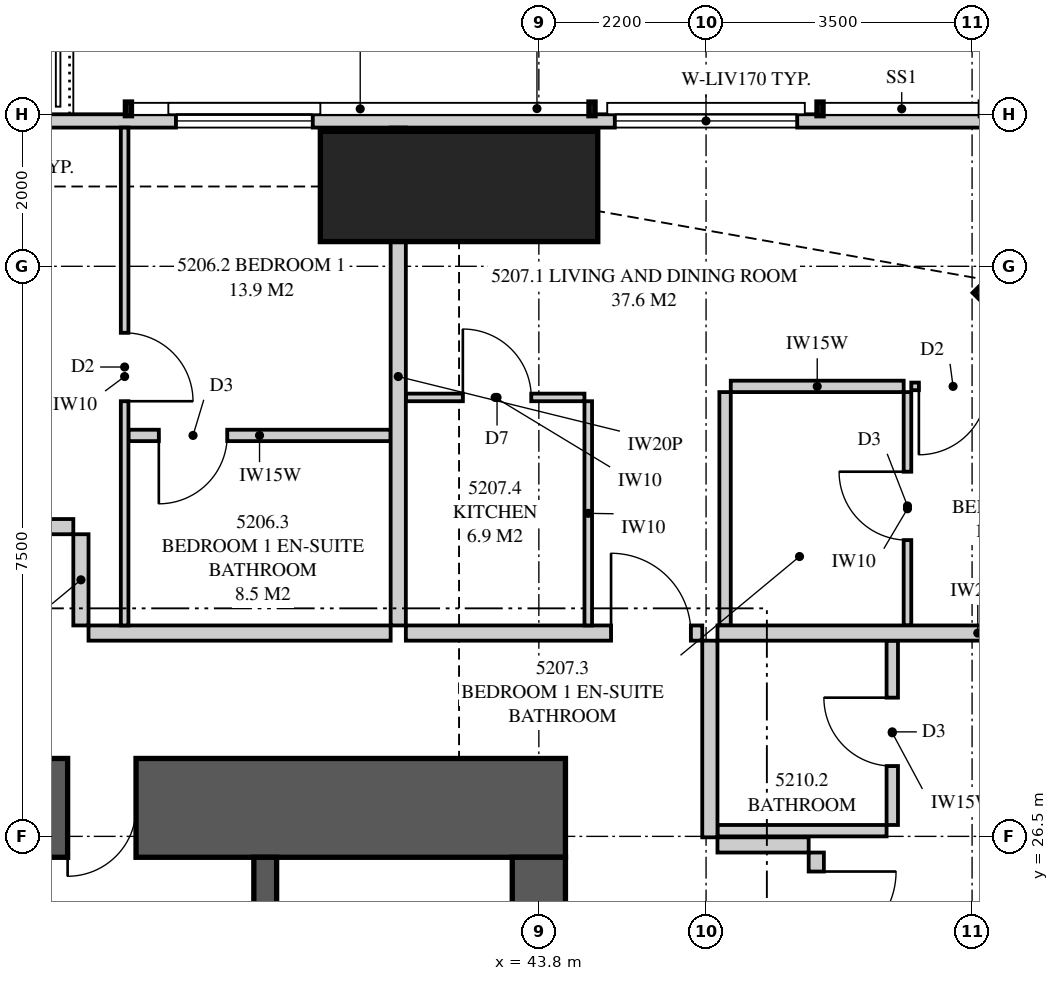
"""IFC4 building model, lengths in metres.
Left out: names, types, materials, properties, quantities, classifications, styles, units other than length and angle.
Written with IfcOpenShell. Run it as: python <this file> out.ifc"""

import sys

from ifc_helpers import new_model, si_unit, direction, frame, frame_2d, origin, origin_2d, place, context, subcontext, project, spatial, polyline, rectangle, outline, extrude, element, fill, save


model = new_model("IFC4")
c1 = context("Model", 3, precision=1e-05, world=origin(), true_north=direction((0.0, 1.0)))
c2 = subcontext(c1, "Body", "Model", "MODEL_VIEW")
j1 = project(units=[si_unit("LENGTHUNIT", "METRE"), si_unit("PLANEANGLEUNIT", "RADIAN")], contexts=[c1])
p1 = place(None, origin())
s1 = spatial("IfcSite", under=j1, at=p1, CompositionType="ELEMENT")
p2 = place(p1, origin())
s2 = spatial("IfcBuilding", under=s1, at=p2, CompositionType="ELEMENT")
p3 = place(p2, frame((0.0, 0.0, 191.2)))
s3 = spatial("IfcBuildingStorey", under=s2, at=p3, CompositionType="ELEMENT", Elevation=191.2)
p4 = place(p3, frame((50.652, 33.652, 0.0), z_axis=(0.0, 0.0, 1.0), x_axis=(0.707106781187, 0.707106781187, 0.0)))
e1 = element("IfcColumn", 1, at=p4, inside=s3, PredefinedType="COLUMN", context=c2, shape_type="SweptSolid", body=[
    extrude(rectangle(XDim=1.6, YDim=1.6, at=origin_2d()), origin(), (0.0, 0.0, 1.0), 3.35),
])
p5 = place(p3, frame((42.75, 35.05, 0.0), z_axis=(0.0, 0.0, 1.0), x_axis=(0.0, 1.0, 0.0)))
e2 = element("IfcColumn", 2, at=p5, inside=s3, PredefinedType="COLUMN", context=c2, shape_type="SweptSolid", body=[
    extrude(rectangle(XDim=1.45, YDim=3.65, at=origin_2d()), origin(), (0.0, 0.0, 1.0), 3.35),
])
p6 = place(p3, frame((44.15, 26.875, 0.0), z_axis=(0.0, 0.0, 1.0), x_axis=(-1.0, 0.0, 0.0)))
e3 = element("IfcWall", 3, at=p6, inside=s3, PredefinedType="SHEAR", context=c2, shape_type="SweptSolid", body=[
    extrude(rectangle(XDim=8.25, YDim=1.3, at=frame_2d((4.125, 0.0))), origin(), (0.0, 0.0, 1.0), 3.35),
])
p7 = place(p6, frame((5.65, 0.0, 0.0)))
e4 = element("IfcOpeningElement", 4, at=p7, cuts=e3, PredefinedType="OPENING", context=c2, shape_type="SweptSolid", body=[
    extrude(rectangle(XDim=0.9, YDim=2.1, at=frame_2d((0.45, 1.05))), frame((0.0, 0.66, 0.0), z_axis=(0.0, -1.0, 0.0), x_axis=(1.0, 0.0, 0.0)), (0.0, 0.0, 1.0), 1.32),
])
p8 = place(p3, frame((43.8, 19.3, 0.0), z_axis=(0.0, 0.0, 1.0), x_axis=(0.0, 1.0, 0.0)))
e5 = element("IfcWall", 5, at=p8, inside=s3, PredefinedType="SHEAR", context=c2, shape_type="SweptSolid", body=[
    extrude(rectangle(XDim=6.925, YDim=0.7, at=frame_2d((3.462, 0.0))), origin(), (0.0, 0.0, 1.0), 3.35),
])
p9 = place(p3, frame((40.2, 18.5, 0.0), z_axis=(0.0, 0.0, 1.0), x_axis=(0.0, 1.0, 0.0)))
e6 = element("IfcWall", 6, at=p9, inside=s3, PredefinedType="SHEAR", context=c2, shape_type="SweptSolid", body=[
    extrude(rectangle(XDim=7.725, YDim=0.3, at=frame_2d((3.863, 0.0))), origin(), (0.0, 0.0, 1.0), 3.35),
])
p10 = place(p3, frame((49.949, 35.913, 0.0), z_axis=(0.0, 0.0, 1.0), x_axis=(-1.0, 0.0, 0.0)))
e7 = element("IfcWall", 7, at=p10, inside=s3, PredefinedType="SOLIDWALL", context=c2, shape_type="SweptSolid", body=[
    extrude(outline(polyline([(0.0, 0.0), (34.897, 0.0), (34.897, 3.11), (27.91, 3.11), (27.91, 2.15), (27.836, 2.15), (27.836, 3.11), (27.699, 3.11), (27.699, 2.15), (7.199, 2.15), (7.199, 3.11), (7.062, 3.11), (7.062, 2.15), (6.987, 2.15), (6.987, 3.11), (0.0, 3.11), (0.0, 0.0)])), frame((0.0, 0.087, 0.0), z_axis=(0.0, -1.0, 0.0), x_axis=(1.0, 0.0, 0.0)), (0.0, 0.0, 1.0), 0.175),
])
p11 = place(p10, frame((2.75, 0.0, 0.4)))
e8 = element("IfcOpeningElement", 8, at=p11, cuts=e7, PredefinedType="OPENING", context=c2, shape_type="SweptSolid", body=[
    extrude(rectangle(XDim=2.4, YDim=1.7, at=frame_2d((1.2, 0.85))), frame((0.0, 0.097, 0.0), z_axis=(0.0, -1.0, 0.0), x_axis=(1.0, 0.0, 0.0)), (0.0, 0.0, 1.0), 0.195),
])
p12 = place(p10, frame((9.124, 0.0, 0.4)))
e9 = element("IfcOpeningElement", 9, at=p12, cuts=e7, PredefinedType="OPENING", context=c2, shape_type="SweptSolid", body=[
    extrude(rectangle(XDim=1.8, YDim=1.7, at=frame_2d((0.9, 0.85))), frame((0.0, 0.097, 0.0), z_axis=(0.0, -1.0, 0.0), x_axis=(1.0, 0.0, 0.0)), (0.0, 0.0, 1.0), 0.195),
])
p13 = place(p10, frame((13.174, 0.0, 0.0)))
e10 = element("IfcOpeningElement", 10, at=p13, cuts=e7, PredefinedType="OPENING", context=c2, shape_type="SweptSolid", body=[
    extrude(rectangle(XDim=1.8, YDim=2.1, at=frame_2d((0.9, 1.05))), frame((0.0, 0.097, 0.0), z_axis=(0.0, -1.0, 0.0), x_axis=(1.0, 0.0, 0.0)), (0.0, 0.0, 1.0), 0.195),
])
p14 = place(p10, frame((19.849, 0.0, 0.4)))
e11 = element("IfcOpeningElement", 11, at=p14, cuts=e7, PredefinedType="OPENING", context=c2, shape_type="SweptSolid", body=[
    extrude(rectangle(XDim=1.8, YDim=1.7, at=frame_2d((0.9, 0.85))), frame((0.0, 0.097, 0.0), z_axis=(0.0, -1.0, 0.0), x_axis=(1.0, 0.0, 0.0)), (0.0, 0.0, 1.0), 0.195),
])
p15 = place(p10, frame((23.304, 0.0, 0.4)))
e12 = element("IfcOpeningElement", 12, at=p15, cuts=e7, PredefinedType="OPENING", context=c2, shape_type="SweptSolid", body=[
    extrude(rectangle(XDim=2.4, YDim=1.7, at=frame_2d((1.2, 0.85))), frame((0.0, 0.097, 0.0), z_axis=(0.0, -1.0, 0.0), x_axis=(1.0, 0.0, 0.0)), (0.0, 0.0, 1.0), 0.195),
])
p16 = place(p10, frame((30.249, 0.0, 0.4)))
e13 = element("IfcOpeningElement", 13, at=p16, cuts=e7, PredefinedType="OPENING", context=c2, shape_type="SweptSolid", body=[
    extrude(rectangle(XDim=1.8, YDim=1.7, at=frame_2d((0.9, 0.85))), frame((0.0, 0.097, 0.0), z_axis=(0.0, -1.0, 0.0), x_axis=(1.0, 0.0, 0.0)), (0.0, 0.0, 1.0), 0.195),
])
p17 = place(p3, frame((41.95, 35.825, 0.0), z_axis=(0.0, 0.0, 1.0), x_axis=(0.0, -1.0, 0.0)))
e14 = element("IfcWall", 14, at=p17, inside=s3, PredefinedType="PARTITIONING", context=c2, shape_type="SweptSolid", body=[
    extrude(outline(polyline([(0.529, 2.15), (0.0, 2.15), (0.0, 0.0), (0.529, 0.0), (0.529, 0.746), (1.021, 0.746), (1.021, 0.0), (6.55, 0.0), (6.55, 3.11), (1.685, 3.11), (1.685, 2.15), (1.021, 2.15), (1.021, 1.404), (0.529, 1.404), (0.529, 2.15)])), frame((0.0, 0.1, 0.0), z_axis=(0.0, -1.0, 0.0), x_axis=(1.0, 0.0, 0.0)), (0.0, 0.0, 1.0), 0.2),
])
p18 = place(p3, frame((38.35, 35.825, 0.0), z_axis=(0.0, 0.0, 1.0), x_axis=(0.0, -1.0, 0.0)))
e15 = element("IfcWall", 15, at=p18, inside=s3, PredefinedType="PARTITIONING", context=c2, shape_type="SweptSolid", body=[
    extrude(outline(polyline([(0.0, 0.0), (6.55, 0.0), (6.55, 3.11), (1.635, 3.11), (1.635, 2.15), (0.0, 2.15), (0.0, 3.11), (0.0, 0.0)])), frame((0.0, 0.05, 0.0), z_axis=(0.0, -1.0, 0.0), x_axis=(1.0, 0.0, 0.0)), (0.0, 0.0, 1.0), 0.1),
])
p19 = place(p18, frame((2.7, 0.0, 0.0)))
e16 = element("IfcOpeningElement", 16, at=p19, cuts=e15, PredefinedType="OPENING", context=c2, shape_type="SweptSolid", body=[
    extrude(rectangle(XDim=0.9, YDim=2.1, at=frame_2d((0.45, 1.05))), frame((0.0, 0.06, 0.0), z_axis=(0.0, -1.0, 0.0), x_axis=(1.0, 0.0, 0.0)), (0.0, 0.0, 1.0), 0.12),
])
p20 = place(p3, frame((38.4, 31.775, 0.0), z_axis=(0.0, 0.0, 1.0), x_axis=(1.0, 0.0, 0.0)))
e17 = element("IfcWall", 17, at=p20, inside=s3, PredefinedType="PLUMBINGWALL", context=c2, shape_type="SweptSolid", body=[
    extrude(rectangle(XDim=3.45, YDim=0.15, at=frame_2d((1.725, 0.0))), origin(), (0.0, 0.0, 1.0), 3.11),
])
p21 = place(p20, frame((0.4, 0.0, 0.0)))
e18 = element("IfcOpeningElement", 18, at=p21, cuts=e17, PredefinedType="OPENING", context=c2, shape_type="SweptSolid", body=[
    extrude(rectangle(XDim=0.9, YDim=2.1, at=frame_2d((0.45, 1.05))), frame((0.0, 0.085, 0.0), z_axis=(0.0, -1.0, 0.0), x_axis=(1.0, 0.0, 0.0)), (0.0, 0.0, 1.0), 0.17),
])
p22 = place(p3, frame((42.05, 29.175, 0.0), z_axis=(0.0, 0.0, 1.0), x_axis=(1.0, 0.0, 0.0)))
e19 = element("IfcWall", 19, at=p22, inside=s3, PredefinedType="PARTITIONING", context=c2, shape_type="SweptSolid", body=[
    extrude(outline(polyline([(0.0, 0.0), (3.9, 0.0), (3.9, 3.11), (1.037, 3.11), (1.037, 2.541), (0.363, 2.541), (0.363, 3.11), (0.0, 3.11), (0.0, 0.0)])), frame((0.0, 0.1, 0.0), z_axis=(0.0, -1.0, 0.0), x_axis=(1.0, 0.0, 0.0)), (0.0, 0.0, 1.0), 0.2),
])
p23 = place(p22, frame((2.7, 0.0, 0.0)))
e20 = element("IfcOpeningElement", 20, at=p23, cuts=e19, PredefinedType="OPENING", context=c2, shape_type="SweptSolid", body=[
    extrude(rectangle(XDim=1.05, YDim=2.2, at=frame_2d((0.525, 1.1))), frame((0.0, 0.11, 0.0), z_axis=(0.0, -1.0, 0.0), x_axis=(1.0, 0.0, 0.0)), (0.0, 0.0, 1.0), 0.22),
])
p24 = place(p3, frame((48.65, 32.345, 0.0), z_axis=(0.0, 0.0, 1.0), x_axis=(0.0, -1.0, 0.0)))
e21 = element("IfcWall", 21, at=p24, inside=s3, PredefinedType="PARTITIONING", context=c2, shape_type="SweptSolid", body=[
    extrude(rectangle(XDim=3.07, YDim=0.1, at=frame_2d((1.535, 0.0))), origin(), (0.0, 0.0, 1.0), 3.11),
])
p25 = place(p24, frame((1.048, 0.0, 0.0)))
e22 = element("IfcOpeningElement", 22, at=p25, cuts=e21, PredefinedType="OPENING", context=c2, shape_type="SweptSolid", body=[
    extrude(rectangle(XDim=0.9, YDim=2.1, at=frame_2d((0.45, 1.05))), frame((0.0, 0.06, 0.0), z_axis=(0.0, -1.0, 0.0), x_axis=(1.0, 0.0, 0.0)), (0.0, 0.0, 1.0), 0.12),
])
p26 = place(p3, frame((48.7, 32.42, 0.0), z_axis=(0.0, 0.0, 1.0), x_axis=(1.0, 0.0, 0.0)))
e23 = element("IfcWall", 23, at=p26, inside=s3, PredefinedType="PARTITIONING", context=c2, shape_type="SweptSolid", body=[
    extrude(outline(polyline([(0.0, 0.0), (4.3, 0.0), (4.3, 3.11), (3.022, 3.11), (3.022, 2.15), (1.279, 2.15), (1.279, 3.11), (0.0, 3.11), (0.0, 0.0)])), frame((0.0, 0.05, 0.0), z_axis=(0.0, -1.0, 0.0), x_axis=(1.0, 0.0, 0.0)), (0.0, 0.0, 1.0), 0.1),
])
p27 = place(p26, frame((0.1, 0.0, 0.0)))
e24 = element("IfcOpeningElement", 24, at=p27, cuts=e23, PredefinedType="OPENING", context=c2, shape_type="SweptSolid", body=[
    extrude(rectangle(XDim=0.9, YDim=2.1, at=frame_2d((0.45, 1.05))), frame((0.0, 0.06, 0.0), z_axis=(0.0, -1.0, 0.0), x_axis=(1.0, 0.0, 0.0)), (0.0, 0.0, 1.0), 0.12),
])
p28 = place(p3, frame((46.325, 32.42, 0.0), z_axis=(0.0, 0.0, 1.0), x_axis=(1.0, 0.0, 0.0)))
e25 = element("IfcWall", 25, at=p28, inside=s3, PredefinedType="PLUMBINGWALL", context=c2, shape_type="SweptSolid", body=[
    extrude(rectangle(XDim=2.275, YDim=0.15, at=frame_2d((1.138, 0.0))), origin(), (0.0, 0.0, 1.0), 3.11),
])
p29 = place(p3, frame((46.25, 32.345, 0.0), z_axis=(0.0, 0.0, 1.0), x_axis=(0.0, -1.0, 0.0)))
e26 = element("IfcWall", 26, at=p29, inside=s3, PredefinedType="PLUMBINGWALL", context=c2, shape_type="SweptSolid", body=[
    extrude(rectangle(XDim=3.07, YDim=0.15, at=frame_2d((1.535, 0.0))), origin(), (0.0, 0.0, 1.0), 3.11),
])
p30 = place(p3, frame((42.05, 32.275, 0.0), z_axis=(0.0, 0.0, 1.0), x_axis=(1.0, 0.0, 0.0)))
e27 = element("IfcWall", 27, at=p30, inside=s3, PredefinedType="PARTITIONING", context=c2, shape_type="SweptSolid", body=[
    extrude(outline(polyline([(0.0, 0.0), (2.35, 0.0), (2.35, 3.11), (0.987, 3.11), (0.987, 2.541), (0.413, 2.541), (0.413, 3.11), (0.0, 3.11), (0.0, 0.0)])), frame((0.0, 0.05, 0.0), z_axis=(0.0, -1.0, 0.0), x_axis=(1.0, 0.0, 0.0)), (0.0, 0.0, 1.0), 0.1),
])
p31 = place(p30, frame((0.75, 0.0, 0.0)))
e28 = element("IfcOpeningElement", 28, at=p31, cuts=e27, PredefinedType="OPENING", context=c2, shape_type="SweptSolid", body=[
    extrude(rectangle(XDim=0.9, YDim=2.1, at=frame_2d((0.45, 1.05))), frame((0.0, 0.06, 0.0), z_axis=(0.0, -1.0, 0.0), x_axis=(1.0, 0.0, 0.0)), (0.0, 0.0, 1.0), 0.12),
])
p32 = place(p3, frame((44.45, 32.225, 0.0), z_axis=(0.0, 0.0, 1.0), x_axis=(0.0, -1.0, 0.0)))
e29 = element("IfcWall", 29, at=p32, inside=s3, PredefinedType="PARTITIONING", context=c2, shape_type="SweptSolid", body=[
    extrude(rectangle(XDim=2.95, YDim=0.1, at=frame_2d((1.475, 0.0))), origin(), (0.0, 0.0, 1.0), 3.11),
])
p33 = place(p3, frame((46.15, 29.175, 0.0), z_axis=(0.0, 0.0, 1.0), x_axis=(1.0, 0.0, 0.0)))
e30 = element("IfcWall", 30, at=p33, inside=s3, PredefinedType="PARTITIONING", context=c2, shape_type="SweptSolid", body=[
    extrude(outline(polyline([(0.0, 0.0), (6.85, 0.0), (6.85, 3.11), (6.147, 3.11), (6.147, 2.15), (4.303, 2.15), (4.303, 3.11), (0.0, 3.11), (0.0, 0.0)])), frame((0.0, 0.1, 0.0), z_axis=(0.0, -1.0, 0.0), x_axis=(1.0, 0.0, 0.0)), (0.0, 0.0, 1.0), 0.2),
])
p34 = place(p3, frame((48.45, 26.65, 0.0), z_axis=(0.0, 0.0, 1.0), x_axis=(0.0, 1.0, 0.0)))
e31 = element("IfcWall", 31, at=p34, inside=s3, PredefinedType="PLUMBINGWALL", context=c2, shape_type="SweptSolid", body=[
    extrude(rectangle(XDim=2.425, YDim=0.15, at=frame_2d((1.212, 0.0))), origin(), (0.0, 0.0, 1.0), 3.11),
])
p35 = place(p34, frame((0.775, 0.0, 0.0)))
e32 = element("IfcOpeningElement", 32, at=p35, cuts=e31, PredefinedType="OPENING", context=c2, shape_type="SweptSolid", body=[
    extrude(rectangle(XDim=0.9, YDim=2.1, at=frame_2d((0.45, 1.05))), frame((0.0, 0.085, 0.0), z_axis=(0.0, -1.0, 0.0), x_axis=(1.0, 0.0, 0.0)), (0.0, 0.0, 1.0), 0.17),
])
p36 = place(p3, frame((48.375, 26.575, 0.0), z_axis=(0.0, 0.0, 1.0), x_axis=(-1.0, 0.0, 0.0)))
e33 = element("IfcWall", 33, at=p36, inside=s3, PredefinedType="PLUMBINGWALL", context=c2, shape_type="SweptSolid", body=[
    extrude(rectangle(XDim=2.225, YDim=0.15, at=frame_2d((1.113, 0.0))), origin(), (0.0, 0.0, 1.0), 3.11),
])
p37 = place(p3, frame((37.875, 29.175, 0.0), z_axis=(0.0, 0.0, 1.0), x_axis=(1.0, 0.0, 0.0)))
e34 = element("IfcWall", 34, at=p37, inside=s3, PredefinedType="PARTITIONING", context=c2, shape_type="SweptSolid", body=[
    extrude(rectangle(XDim=3.975, YDim=0.2, at=frame_2d((1.988, 0.0))), origin(), (0.0, 0.0, 1.0), 3.11),
])
p38 = place(p3, frame((35.275, 30.575, 0.0), z_axis=(0.0, 0.0, 1.0), x_axis=(1.0, 0.0, 0.0)))
e35 = element("IfcWall", 35, at=p38, inside=s3, PredefinedType="PARTITIONING", context=c2, shape_type="SweptSolid", body=[
    extrude(rectangle(XDim=2.4, YDim=0.2, at=frame_2d((1.2, 0.0))), origin(), (0.0, 0.0, 1.0), 3.11),
])
p39 = place(p38, frame((0.7, 0.0, 0.0)))
e36 = element("IfcOpeningElement", 36, at=p39, cuts=e35, PredefinedType="OPENING", context=c2, shape_type="SweptSolid", body=[
    extrude(rectangle(XDim=1.05, YDim=2.2, at=frame_2d((0.525, 1.1))), frame((0.0, 0.11, 0.0), z_axis=(0.0, -1.0, 0.0), x_axis=(1.0, 0.0, 0.0)), (0.0, 0.0, 1.0), 0.22),
])
p40 = place(p3, frame((37.775, 29.275, 0.0), z_axis=(0.0, 0.0, 1.0), x_axis=(0.0, 1.0, 0.0)))
e37 = element("IfcWall", 37, at=p40, inside=s3, PredefinedType="PARTITIONING", context=c2, shape_type="SweptSolid", body=[
    extrude(rectangle(XDim=1.2, YDim=0.2, at=frame_2d((0.6, 0.0))), origin(), (0.0, 0.0, 1.0), 3.11),
])
p41 = place(p3, frame((46.05, 26.488, 0.0), z_axis=(0.0, 0.0, 1.0), x_axis=(0.0, 1.0, 0.0)))
e38 = element("IfcWall", 38, at=p41, inside=s3, PredefinedType="PARTITIONING", context=c2, shape_type="SweptSolid", body=[
    extrude(rectangle(XDim=2.587, YDim=0.2, at=frame_2d((1.294, 0.0))), origin(), (0.0, 0.0, 1.0), 3.11),
])
p42 = place(p3, frame((47.45, 23.887, 0.0), z_axis=(0.0, 0.0, 1.0), x_axis=(0.0, 1.0, 0.0)))
e39 = element("IfcWall", 39, at=p42, inside=s3, PredefinedType="PARTITIONING", context=c2, shape_type="SweptSolid", body=[
    extrude(outline(polyline([(0.0, 0.0), (2.4, 0.0), (2.4, 3.11), (1.45, 3.11), (1.45, 2.541), (0.775, 2.541), (0.775, 3.11), (0.0, 3.11), (0.0, 0.0)])), frame((0.0, 0.1, 0.0), z_axis=(0.0, -1.0, 0.0), x_axis=(1.0, 0.0, 0.0)), (0.0, 0.0, 1.0), 0.2),
])
p43 = place(p42, frame((1.1, 0.0, 0.0)))
e40 = element("IfcOpeningElement", 40, at=p43, cuts=e39, PredefinedType="OPENING", context=c2, shape_type="SweptSolid", body=[
    extrude(rectangle(XDim=1.05, YDim=2.2, at=frame_2d((0.525, 1.1))), frame((0.0, 0.11, 0.0), z_axis=(0.0, -1.0, 0.0), x_axis=(1.0, 0.0, 0.0)), (0.0, 0.0, 1.0), 0.22),
])
p44 = place(p3, frame((46.15, 26.387, 0.0), z_axis=(0.0, 0.0, 1.0), x_axis=(1.0, 0.0, 0.0)))
e41 = element("IfcWall", 41, at=p44, inside=s3, PredefinedType="PARTITIONING", context=c2, shape_type="SweptSolid", body=[
    extrude(rectangle(XDim=1.2, YDim=0.2, at=frame_2d((0.6, 0.0))), origin(), (0.0, 0.0, 1.0), 3.11),
])
p45 = place(p11, origin())
e42 = element("IfcWindow", 42, at=p45, inside=s3, PartitioningType="SINGLE_PANEL", PredefinedType="WINDOW", context=c2, shape_type="SweptSolid", body=[
    extrude(rectangle(XDim=2.4, YDim=1.7, at=frame_2d((1.2, 0.85))), frame((0.0, 0.03, 0.0), z_axis=(0.0, -1.0, 0.0), x_axis=(1.0, 0.0, 0.0)), (0.0, 0.0, 1.0), 0.06),
])
fill(e8, e42)
p46 = place(p12, origin())
e43 = element("IfcWindow", 43, at=p46, inside=s3, PartitioningType="SINGLE_PANEL", PredefinedType="WINDOW", context=c2, shape_type="SweptSolid", body=[
    extrude(rectangle(XDim=1.8, YDim=1.7, at=frame_2d((0.9, 0.85))), frame((0.0, 0.03, 0.0), z_axis=(0.0, -1.0, 0.0), x_axis=(1.0, 0.0, 0.0)), (0.0, 0.0, 1.0), 0.06),
])
fill(e9, e43)
p47 = place(p19, origin())
e44 = element("IfcDoor", 44, at=p47, inside=s3, OperationType="SINGLE_SWING_RIGHT", PredefinedType="DOOR", context=c2, shape_type="SweptSolid", body=[
    extrude(rectangle(XDim=0.9, YDim=2.1, at=frame_2d((0.45, 1.05))), frame((0.0, 0.025, 0.0), z_axis=(0.0, -1.0, 0.0), x_axis=(1.0, 0.0, 0.0)), (0.0, 0.0, 1.0), 0.05),
])
fill(e16, e44)
p48 = place(p21, frame((0.9, 0.0, 0.0), z_axis=(0.0, 0.0, 1.0), x_axis=(-1.0, 0.0, 0.0)))
e45 = element("IfcDoor", 45, at=p48, inside=s3, OperationType="SINGLE_SWING_RIGHT", PredefinedType="DOOR", context=c2, shape_type="SweptSolid", body=[
    extrude(rectangle(XDim=0.9, YDim=2.1, at=frame_2d((0.45, 1.05))), frame((0.0, 0.025, 0.0), z_axis=(0.0, -1.0, 0.0), x_axis=(1.0, 0.0, 0.0)), (0.0, 0.0, 1.0), 0.05),
])
fill(e18, e45)
p49 = place(p23, origin())
e46 = element("IfcDoor", 46, at=p49, inside=s3, OperationType="SINGLE_SWING_LEFT", PredefinedType="DOOR", context=c2, shape_type="SweptSolid", body=[
    extrude(rectangle(XDim=1.05, YDim=2.2, at=frame_2d((0.525, 1.1))), frame((0.0, 0.025, 0.0), z_axis=(0.0, -1.0, 0.0), x_axis=(1.0, 0.0, 0.0)), (0.0, 0.0, 1.0), 0.05),
])
fill(e20, e46)
p50 = place(p27, frame((0.9, 0.0, 0.0), z_axis=(0.0, 0.0, 1.0), x_axis=(-1.0, 0.0, 0.0)))
e47 = element("IfcDoor", 47, at=p50, inside=s3, OperationType="SINGLE_SWING_RIGHT", PredefinedType="DOOR", context=c2, shape_type="SweptSolid", body=[
    extrude(rectangle(XDim=0.9, YDim=2.1, at=frame_2d((0.45, 1.05))), frame((0.0, 0.025, 0.0), z_axis=(0.0, -1.0, 0.0), x_axis=(1.0, 0.0, 0.0)), (0.0, 0.0, 1.0), 0.05),
])
fill(e24, e47)
p51 = place(p25, frame((0.9, 0.0, 0.0), z_axis=(0.0, 0.0, 1.0), x_axis=(-1.0, 0.0, 0.0)))
e48 = element("IfcDoor", 48, at=p51, inside=s3, OperationType="SINGLE_SWING_RIGHT", PredefinedType="DOOR", context=c2, shape_type="SweptSolid", body=[
    extrude(rectangle(XDim=0.9, YDim=2.1, at=frame_2d((0.45, 1.05))), frame((0.0, 0.025, 0.0), z_axis=(0.0, -1.0, 0.0), x_axis=(1.0, 0.0, 0.0)), (0.0, 0.0, 1.0), 0.05),
])
fill(e22, e48)
p52 = place(p31, origin())
e49 = element("IfcDoor", 49, at=p52, inside=s3, OperationType="SINGLE_SWING_LEFT", PredefinedType="DOOR", context=c2, shape_type="SweptSolid", body=[
    extrude(rectangle(XDim=0.9, YDim=2.1, at=frame_2d((0.45, 1.05))), frame((0.0, 0.025, 0.0), z_axis=(0.0, -1.0, 0.0), x_axis=(1.0, 0.0, 0.0)), (0.0, 0.0, 1.0), 0.05),
])
fill(e28, e49)
p53 = place(p43, frame((1.05, 0.0, 0.0), z_axis=(0.0, 0.0, 1.0), x_axis=(-1.0, 0.0, 0.0)))
e50 = element("IfcDoor", 50, at=p53, inside=s3, OperationType="SINGLE_SWING_LEFT", PredefinedType="DOOR", context=c2, shape_type="SweptSolid", body=[
    extrude(rectangle(XDim=1.05, YDim=2.2, at=frame_2d((0.525, 1.1))), frame((0.0, 0.025, 0.0), z_axis=(0.0, -1.0, 0.0), x_axis=(1.0, 0.0, 0.0)), (0.0, 0.0, 1.0), 0.05),
])
fill(e40, e50)
p54 = place(p35, origin())
e51 = element("IfcDoor", 51, at=p54, inside=s3, OperationType="SINGLE_SWING_RIGHT", PredefinedType="DOOR", context=c2, shape_type="SweptSolid", body=[
    extrude(rectangle(XDim=0.9, YDim=2.1, at=frame_2d((0.45, 1.05))), frame((0.0, 0.025, 0.0), z_axis=(0.0, -1.0, 0.0), x_axis=(1.0, 0.0, 0.0)), (0.0, 0.0, 1.0), 0.05),
])
fill(e32, e51)
p55 = place(p7, origin())
e52 = element("IfcDoor", 52, at=p55, inside=s3, OperationType="SINGLE_SWING_RIGHT", PredefinedType="DOOR", context=c2, shape_type="SweptSolid", body=[
    extrude(rectangle(XDim=0.9, YDim=2.1, at=frame_2d((0.45, 1.05))), frame((0.0, 0.47, 0.0), z_axis=(0.0, -1.0, 0.0), x_axis=(1.0, 0.0, 0.0)), (0.0, 0.0, 1.0), 0.8),
])
fill(e4, e52)
save(model, sys.argv[1])
